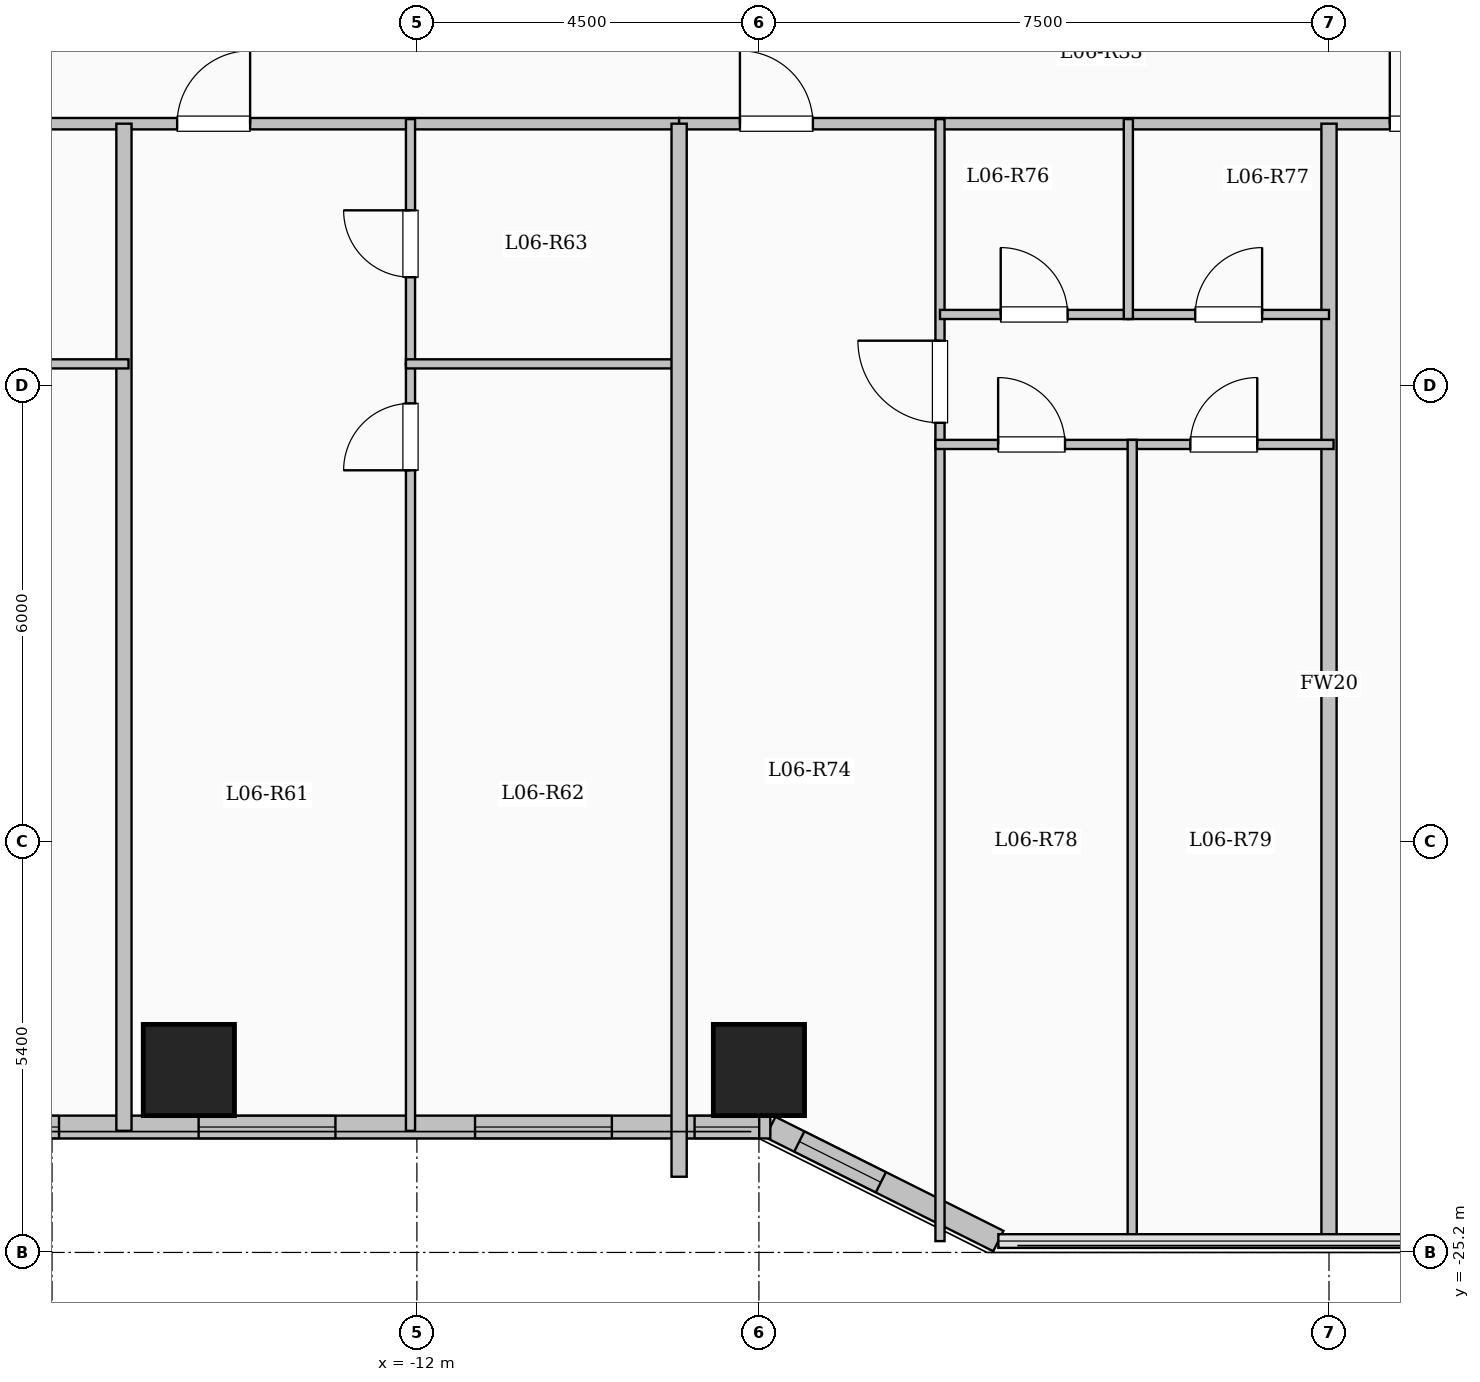
"""IFC4 building model, lengths in metres.
Left out: names, types, materials, properties, quantities, classifications, styles, units other than length and angle.
Written with IfcOpenShell. Run it as: python <this file> out.ifc"""

import sys

from ifc_helpers import new_model, si_unit, direction, frame, frame_2d, origin, origin_2d, place, context, subcontext, project, spatial, rectangle, extrude, element, fill, save


model = new_model("IFC4")
c1 = context("Model", 3, precision=1e-05, world=origin(), true_north=direction((0.0, 1.0)))
c2 = subcontext(c1, "Body", "Model", "MODEL_VIEW")
j1 = project(units=[si_unit("LENGTHUNIT", "METRE"), si_unit("PLANEANGLEUNIT", "RADIAN")], contexts=[c1])
p1 = place(None, origin())
s1 = spatial("IfcSite", under=j1, at=p1, CompositionType="ELEMENT")
p2 = place(p1, origin())
s2 = spatial("IfcBuilding", under=s1, at=p2, CompositionType="ELEMENT")
p3 = place(p2, frame((0.0, 0.0, 27.35)))
s3 = spatial("IfcBuildingStorey", under=s2, at=p3, CompositionType="ELEMENT", Elevation=27.35)
for number, where, z_axis, x_axis in (
    (1, (-15.0, -22.8, 0.0), (0.0, 0.0, 1.0), (1.0, 0.0, 0.0)),
    (2, (-7.5, -22.8, 0.0), (0.0, 0.0, 1.0), (1.0, 0.0, 0.0)),
):
    element("IfcColumn", number, at=place(p3, frame(where, z_axis=z_axis, x_axis=x_axis)), inside=s3, PredefinedType="COLUMN", context=c2, shape_type="SweptSolid", body=[
        extrude(rectangle(XDim=1.2, YDim=1.2, at=origin_2d()), origin(), (0.0, 0.0, 1.0), 3.35),
    ])
p4 = place(p3, frame((-4.35, -25.05, 0.0), z_axis=(0.0, 0.0, 1.0), x_axis=(-0.894427191, 0.4472135955, 0.0)))
e3 = element("IfcWall", 3, at=p4, inside=s3, PredefinedType="SOLIDWALL", context=c2, shape_type="SweptSolid", body=[
    extrude(rectangle(XDim=3.354, YDim=0.3, at=frame_2d((1.677, 0.0))), origin(), (0.0, 0.0, 1.0), 3.1),
])
p5 = place(p4, frame((1.728, 0.0, 0.95)))
e4 = element("IfcOpeningElement", 4, at=p5, cuts=e3, PredefinedType="OPENING", context=c2, shape_type="SweptSolid", body=[
    extrude(rectangle(XDim=1.2, YDim=1.5, at=frame_2d((0.6, 0.75))), frame((0.0, 0.16, 0.0), z_axis=(0.0, -1.0, 0.0), x_axis=(1.0, 0.0, 0.0)), (0.0, 0.0, 1.0), 0.32),
])
p6 = place(p3, frame((-7.35, -23.55, 0.0), z_axis=(0.0, 0.0, 1.0), x_axis=(-1.0, 0.0, 0.0)))
e5 = element("IfcWall", 5, at=p6, inside=s3, PredefinedType="SOLIDWALL", context=c2, shape_type="SweptSolid", body=[
    extrude(rectangle(XDim=15.3, YDim=0.3, at=frame_2d((7.65, 0.0))), origin(), (0.0, 0.0, 1.0), 3.1),
])
p7 = place(p6, frame((0.147, 0.0, 0.95)))
e6 = element("IfcOpeningElement", 6, at=p7, cuts=e5, PredefinedType="OPENING", context=c2, shape_type="SweptSolid", body=[
    extrude(rectangle(XDim=0.85, YDim=1.5, at=frame_2d((0.425, 0.75))), frame((0.0, 0.16, 0.0), z_axis=(0.0, -1.0, 0.0), x_axis=(1.0, 0.0, 0.0)), (0.0, 0.0, 1.0), 0.32),
])
p8 = place(p6, frame((2.085, 0.0, 0.9)))
e7 = element("IfcOpeningElement", 7, at=p8, cuts=e5, PredefinedType="OPENING", context=c2, shape_type="SweptSolid", body=[
    extrude(rectangle(XDim=1.8, YDim=1.65, at=frame_2d((0.9, 0.825))), frame((0.0, 0.16, 0.0), z_axis=(0.0, -1.0, 0.0), x_axis=(1.0, 0.0, 0.0)), (0.0, 0.0, 1.0), 0.32),
])
p9 = place(p6, frame((5.722, 0.0, 0.9)))
e8 = element("IfcOpeningElement", 8, at=p9, cuts=e5, PredefinedType="OPENING", context=c2, shape_type="SweptSolid", body=[
    extrude(rectangle(XDim=1.8, YDim=1.65, at=frame_2d((0.9, 0.825))), frame((0.0, 0.16, 0.0), z_axis=(0.0, -1.0, 0.0), x_axis=(1.0, 0.0, 0.0)), (0.0, 0.0, 1.0), 0.32),
])
p10 = place(p6, frame((9.358, 0.0, 0.9)))
e9 = element("IfcOpeningElement", 9, at=p10, cuts=e5, PredefinedType="OPENING", context=c2, shape_type="SweptSolid", body=[
    extrude(rectangle(XDim=1.5, YDim=1.65, at=frame_2d((0.75, 0.825))), frame((0.0, 0.16, 0.0), z_axis=(0.0, -1.0, 0.0), x_axis=(1.0, 0.0, 0.0)), (0.0, 0.0, 1.0), 0.32),
])
p11 = place(p6, frame((12.569, 0.0, 0.9)))
e10 = element("IfcOpeningElement", 10, at=p11, cuts=e5, PredefinedType="OPENING", context=c2, shape_type="SweptSolid", body=[
    extrude(rectangle(XDim=1.8, YDim=1.65, at=frame_2d((0.9, 0.825))), frame((0.0, 0.16, 0.0), z_axis=(0.0, -1.0, 0.0), x_axis=(1.0, 0.0, 0.0)), (0.0, 0.0, 1.0), 0.32),
])
p12 = place(p3, frame((-22.55, -10.35, 0.0), z_axis=(0.0, 0.0, 1.0), x_axis=(1.0, 0.0, 0.0)))
e11 = element("IfcWall", 11, at=p12, inside=s3, PredefinedType="PARTITIONING", context=c2, shape_type="SweptSolid", body=[
    extrude(rectangle(XDim=14.0, YDim=0.15, at=frame_2d((7.0, 0.0))), origin(), (0.0, 0.0, 1.0), 3.1),
])
p13 = place(p12, frame((0.7, 0.0, 0.0)))
e12 = element("IfcOpeningElement", 12, at=p13, cuts=e11, PredefinedType="OPENING", context=c2, shape_type="SweptSolid", body=[
    extrude(rectangle(XDim=0.96, YDim=2.15, at=frame_2d((0.48, 1.075))), frame((0.0, 0.085, 0.0), z_axis=(0.0, -1.0, 0.0), x_axis=(1.0, 0.0, 0.0)), (0.0, 0.0, 1.0), 0.17),
])
p14 = place(p12, frame((7.396, 0.0, 0.0)))
e13 = element("IfcOpeningElement", 13, at=p14, cuts=e11, PredefinedType="OPENING", context=c2, shape_type="SweptSolid", body=[
    extrude(rectangle(XDim=0.96, YDim=2.15, at=frame_2d((0.48, 1.075))), frame((0.0, 0.085, 0.0), z_axis=(0.0, -1.0, 0.0), x_axis=(1.0, 0.0, 0.0)), (0.0, 0.0, 1.0), 0.17),
])
p15 = place(p3, frame((-8.55, -10.35, 0.0), z_axis=(0.0, 0.0, 1.0), x_axis=(1.0, 0.0, 0.0)))
e14 = element("IfcWall", 14, at=p15, inside=s3, PredefinedType="PARTITIONING", context=c2, shape_type="SweptSolid", body=[
    extrude(rectangle(XDim=17.1, YDim=0.15, at=frame_2d((8.55, 0.0))), origin(), (0.0, 0.0, 1.0), 3.1),
])
p16 = place(p15, frame((0.8, 0.0, 0.0)))
e15 = element("IfcOpeningElement", 15, at=p16, cuts=e14, PredefinedType="OPENING", context=c2, shape_type="SweptSolid", body=[
    extrude(rectangle(XDim=0.96, YDim=2.15, at=frame_2d((0.48, 1.075))), frame((0.0, 0.085, 0.0), z_axis=(0.0, -1.0, 0.0), x_axis=(1.0, 0.0, 0.0)), (0.0, 0.0, 1.0), 0.17),
])
p17 = place(p15, frame((9.35, 0.0, 0.0)))
e16 = element("IfcOpeningElement", 16, at=p17, cuts=e14, PredefinedType="OPENING", context=c2, shape_type="SweptSolid", body=[
    extrude(rectangle(XDim=0.96, YDim=2.15, at=frame_2d((0.48, 1.075))), frame((0.0, 0.085, 0.0), z_axis=(0.0, -1.0, 0.0), x_axis=(1.0, 0.0, 0.0)), (0.0, 0.0, 1.0), 0.17),
])
p18 = place(p3, frame((-15.854, -23.6, 0.0), z_axis=(0.0, 0.0, 1.0), x_axis=(0.0, 1.0, 0.0)))
e17 = element("IfcWall", 17, at=p18, inside=s3, PredefinedType="SOLIDWALL", context=c2, shape_type="SweptSolid", body=[
    extrude(rectangle(XDim=13.25, YDim=0.2, at=frame_2d((6.625, 0.0))), origin(), (0.0, 0.0, 1.0), 3.1),
])
p19 = place(p3, frame((-19.13, -13.51, 0.0), z_axis=(0.0, 0.0, 1.0), x_axis=(1.0, 0.0, 0.0)))
e18 = element("IfcWall", 18, at=p19, inside=s3, PredefinedType="PARTITIONING", context=c2, shape_type="SweptSolid", body=[
    extrude(rectangle(XDim=3.336, YDim=0.12, at=frame_2d((1.668, 0.0))), origin(), (0.0, 0.0, 1.0), 3.1),
])
p20 = place(p3, frame((-12.084, -23.6, 0.0), z_axis=(0.0, 0.0, 1.0), x_axis=(0.0, 1.0, 0.0)))
e19 = element("IfcWall", 19, at=p20, inside=s3, PredefinedType="PARTITIONING", context=c2, shape_type="SweptSolid", body=[
    extrude(rectangle(XDim=10.09, YDim=0.12, at=frame_2d((5.045, 0.0))), origin(), (0.0, 0.0, 1.0), 3.1),
])
p21 = place(p20, frame((8.69, 0.0, 0.0)))
e20 = element("IfcOpeningElement", 20, at=p21, cuts=e19, PredefinedType="OPENING", context=c2, shape_type="SweptSolid", body=[
    extrude(rectangle(XDim=0.88, YDim=2.1, at=frame_2d((0.44, 1.05))), frame((0.0, 0.07, 0.0), z_axis=(0.0, -1.0, 0.0), x_axis=(1.0, 0.0, 0.0)), (0.0, 0.0, 1.0), 0.14),
])
p22 = place(p3, frame((-12.084, -13.51, 0.0), z_axis=(0.0, 0.0, 1.0), x_axis=(0.0, 1.0, 0.0)))
e21 = element("IfcWall", 21, at=p22, inside=s3, PredefinedType="PARTITIONING", context=c2, shape_type="SweptSolid", body=[
    extrude(rectangle(XDim=3.22, YDim=0.12, at=frame_2d((1.61, 0.0))), origin(), (0.0, 0.0, 1.0), 3.1),
])
p23 = place(p22, frame((1.14, 0.0, 0.0)))
e22 = element("IfcOpeningElement", 22, at=p23, cuts=e21, PredefinedType="OPENING", context=c2, shape_type="SweptSolid", body=[
    extrude(rectangle(XDim=0.88, YDim=2.1, at=frame_2d((0.44, 1.05))), frame((0.0, 0.07, 0.0), z_axis=(0.0, -1.0, 0.0), x_axis=(1.0, 0.0, 0.0)), (0.0, 0.0, 1.0), 0.14),
])
p24 = place(p3, frame((-12.144, -13.51, 0.0), z_axis=(0.0, 0.0, 1.0), x_axis=(1.0, 0.0, 0.0)))
e23 = element("IfcWall", 23, at=p24, inside=s3, PredefinedType="PARTITIONING", context=c2, shape_type="SweptSolid", body=[
    extrude(rectangle(XDim=3.604, YDim=0.12, at=frame_2d((1.802, 0.0))), origin(), (0.0, 0.0, 1.0), 3.1),
])
p25 = place(p3, frame((-8.55, -24.204, 0.0), z_axis=(0.0, 0.0, 1.0), x_axis=(0.0, 1.0, 0.0)))
e24 = element("IfcWall", 24, at=p25, inside=s3, PredefinedType="SOLIDWALL", context=c2, shape_type="SweptSolid", body=[
    extrude(rectangle(XDim=13.854, YDim=0.2, at=frame_2d((6.927, 0.0))), origin(), (0.0, 0.0, 1.0), 3.1),
])
p26 = place(p3, frame((0.0, -25.08, 0.0), z_axis=(0.0, 0.0, 1.0), x_axis=(0.0, 1.0, 0.0)))
e25 = element("IfcWall", 25, at=p26, inside=s3, PredefinedType="SOLIDWALL", context=c2, shape_type="SweptSolid", body=[
    extrude(rectangle(XDim=14.73, YDim=0.2, at=frame_2d((7.365, 0.0))), origin(), (0.0, 0.0, 1.0), 3.1),
])
p27 = place(p3, frame((-5.118, -25.051, 0.0), z_axis=(0.0, 0.0, 1.0), x_axis=(0.0, 1.0, 0.0)))
e26 = element("IfcWall", 26, at=p27, inside=s3, PredefinedType="PARTITIONING", context=c2, shape_type="SweptSolid", body=[
    extrude(rectangle(XDim=14.761, YDim=0.12, at=frame_2d((7.38, 0.0))), origin(), (0.0, 0.0, 1.0), 3.1),
])
p28 = place(p27, frame((10.766, 0.0, 0.0)))
e27 = element("IfcOpeningElement", 27, at=p28, cuts=e26, PredefinedType="OPENING", context=c2, shape_type="SweptSolid", body=[
    extrude(rectangle(XDim=1.08, YDim=2.15, at=frame_2d((0.54, 1.075))), frame((0.0, 0.07, 0.0), z_axis=(0.0, -1.0, 0.0), x_axis=(1.0, 0.0, 0.0)), (0.0, 0.0, 1.0), 0.14),
])
p29 = place(p3, frame((-5.118, -12.86, 0.0), z_axis=(0.0, 0.0, 1.0), x_axis=(1.0, 0.0, 0.0)))
e28 = element("IfcWall", 28, at=p29, inside=s3, PredefinedType="PARTITIONING", context=c2, shape_type="SweptSolid", body=[
    extrude(rectangle(XDim=2.478, YDim=0.12, at=frame_2d((1.239, 0.0))), origin(), (0.0, 0.0, 1.0), 2.585),
])
p30 = place(p29, frame((0.799, 0.0, 0.0)))
e29 = element("IfcOpeningElement", 29, at=p30, cuts=e28, PredefinedType="OPENING", context=c2, shape_type="SweptSolid", body=[
    extrude(rectangle(XDim=0.88, YDim=2.1, at=frame_2d((0.44, 1.05))), frame((0.0, 0.07, 0.0), z_axis=(0.0, -1.0, 0.0), x_axis=(1.0, 0.0, 0.0)), (0.0, 0.0, 1.0), 0.14),
])
p31 = place(p3, frame((-2.64, -12.86, 0.0), z_axis=(0.0, 0.0, 1.0), x_axis=(1.0, 0.0, 0.0)))
e30 = element("IfcWall", 30, at=p31, inside=s3, PredefinedType="PARTITIONING", context=c2, shape_type="SweptSolid", body=[
    extrude(rectangle(XDim=2.64, YDim=0.12, at=frame_2d((1.32, 0.0))), origin(), (0.0, 0.0, 1.0), 2.585),
])
p32 = place(p31, frame((0.88, 0.0, 0.0)))
e31 = element("IfcOpeningElement", 31, at=p32, cuts=e30, PredefinedType="OPENING", context=c2, shape_type="SweptSolid", body=[
    extrude(rectangle(XDim=0.88, YDim=2.1, at=frame_2d((0.44, 1.05))), frame((0.0, 0.07, 0.0), z_axis=(0.0, -1.0, 0.0), x_axis=(1.0, 0.0, 0.0)), (0.0, 0.0, 1.0), 0.14),
])
p33 = place(p3, frame((-5.178, -14.57, 0.0), z_axis=(0.0, 0.0, 1.0), x_axis=(1.0, 0.0, 0.0)))
e32 = element("IfcWall", 32, at=p33, inside=s3, PredefinedType="PARTITIONING", context=c2, shape_type="SweptSolid", body=[
    extrude(rectangle(XDim=5.238, YDim=0.12, at=frame_2d((2.619, 0.0))), origin(), (0.0, 0.0, 1.0), 3.1),
])
p34 = place(p33, frame((0.825, 0.0, 0.0)))
e33 = element("IfcOpeningElement", 33, at=p34, cuts=e32, PredefinedType="OPENING", context=c2, shape_type="SweptSolid", body=[
    extrude(rectangle(XDim=0.88, YDim=2.1, at=frame_2d((0.44, 1.05))), frame((0.0, 0.07, 0.0), z_axis=(0.0, -1.0, 0.0), x_axis=(1.0, 0.0, 0.0)), (0.0, 0.0, 1.0), 0.14),
])
p35 = place(p33, frame((3.354, 0.0, 0.0)))
e34 = element("IfcOpeningElement", 34, at=p35, cuts=e32, PredefinedType="OPENING", context=c2, shape_type="SweptSolid", body=[
    extrude(rectangle(XDim=0.88, YDim=2.1, at=frame_2d((0.44, 1.05))), frame((0.0, 0.07, 0.0), z_axis=(0.0, -1.0, 0.0), x_axis=(1.0, 0.0, 0.0)), (0.0, 0.0, 1.0), 0.14),
])
p36 = place(p3, frame((-2.64, -12.92, 0.0), z_axis=(0.0, 0.0, 1.0), x_axis=(0.0, 1.0, 0.0)))
e35 = element("IfcWall", 35, at=p36, inside=s3, PredefinedType="PARTITIONING", context=c2, shape_type="SweptSolid", body=[
    extrude(rectangle(XDim=2.63, YDim=0.12, at=frame_2d((1.315, 0.0))), origin(), (0.0, 0.0, 1.0), 3.1),
])
p37 = place(p3, frame((-2.589, -25.08, 0.0), z_axis=(0.0, 0.0, 1.0), x_axis=(0.0, 1.0, 0.0)))
e36 = element("IfcWall", 36, at=p37, inside=s3, PredefinedType="PARTITIONING", context=c2, shape_type="SweptSolid", body=[
    extrude(rectangle(XDim=10.57, YDim=0.12, at=frame_2d((5.285, 0.0))), origin(), (0.0, 0.0, 1.0), 3.1),
])
p38 = place(p5, origin())
e37 = element("IfcWindow", 37, at=p38, inside=s3, PartitioningType="SINGLE_PANEL", PredefinedType="WINDOW", context=c2, shape_type="SweptSolid", body=[
    extrude(rectangle(XDim=1.2, YDim=1.5, at=frame_2d((0.6, 0.75))), frame((0.0, 0.03, 0.0), z_axis=(0.0, -1.0, 0.0), x_axis=(1.0, 0.0, 0.0)), (0.0, 0.0, 1.0), 0.06),
])
fill(e4, e37)
p39 = place(p7, origin())
e38 = element("IfcWindow", 38, at=p39, inside=s3, PartitioningType="SINGLE_PANEL", PredefinedType="WINDOW", context=c2, shape_type="SweptSolid", body=[
    extrude(rectangle(XDim=0.85, YDim=1.5, at=frame_2d((0.425, 0.75))), frame((0.0, 0.03, 0.0), z_axis=(0.0, -1.0, 0.0), x_axis=(1.0, 0.0, 0.0)), (0.0, 0.0, 1.0), 0.06),
])
fill(e6, e38)
p40 = place(p8, origin())
e39 = element("IfcWindow", 39, at=p40, inside=s3, PartitioningType="SINGLE_PANEL", PredefinedType="WINDOW", context=c2, shape_type="SweptSolid", body=[
    extrude(rectangle(XDim=1.8, YDim=1.65, at=frame_2d((0.9, 0.825))), frame((0.0, 0.03, 0.0), z_axis=(0.0, -1.0, 0.0), x_axis=(1.0, 0.0, 0.0)), (0.0, 0.0, 1.0), 0.06),
])
fill(e7, e39)
p41 = place(p9, origin())
e40 = element("IfcWindow", 40, at=p41, inside=s3, PartitioningType="SINGLE_PANEL", PredefinedType="WINDOW", context=c2, shape_type="SweptSolid", body=[
    extrude(rectangle(XDim=1.8, YDim=1.65, at=frame_2d((0.9, 0.825))), frame((0.0, 0.03, 0.0), z_axis=(0.0, -1.0, 0.0), x_axis=(1.0, 0.0, 0.0)), (0.0, 0.0, 1.0), 0.06),
])
fill(e8, e40)
p42 = place(p10, origin())
e41 = element("IfcWindow", 41, at=p42, inside=s3, PartitioningType="SINGLE_PANEL", PredefinedType="WINDOW", context=c2, shape_type="SweptSolid", body=[
    extrude(rectangle(XDim=1.5, YDim=1.65, at=frame_2d((0.75, 0.825))), frame((0.0, 0.03, 0.0), z_axis=(0.0, -1.0, 0.0), x_axis=(1.0, 0.0, 0.0)), (0.0, 0.0, 1.0), 0.06),
])
fill(e9, e41)
p43 = place(p14, origin())
e42 = element("IfcDoor", 42, at=p43, inside=s3, OperationType="SINGLE_SWING_RIGHT", PredefinedType="DOOR", context=c2, shape_type="SweptSolid", body=[
    extrude(rectangle(XDim=0.96, YDim=2.15, at=frame_2d((0.48, 1.075))), frame((0.0, 0.025, 0.0), z_axis=(0.0, -1.0, 0.0), x_axis=(1.0, 0.0, 0.0)), (0.0, 0.0, 1.0), 0.05),
])
fill(e13, e42)
p44 = place(p21, origin())
e43 = element("IfcDoor", 43, at=p44, inside=s3, OperationType="SINGLE_SWING_LEFT", PredefinedType="DOOR", context=c2, shape_type="SweptSolid", body=[
    extrude(rectangle(XDim=0.88, YDim=2.1, at=frame_2d((0.44, 1.05))), frame((0.0, 0.025, 0.0), z_axis=(0.0, -1.0, 0.0), x_axis=(1.0, 0.0, 0.0)), (0.0, 0.0, 1.0), 0.05),
])
fill(e20, e43)
p45 = place(p23, origin())
e44 = element("IfcDoor", 44, at=p45, inside=s3, OperationType="SINGLE_SWING_RIGHT", PredefinedType="DOOR", context=c2, shape_type="SweptSolid", body=[
    extrude(rectangle(XDim=0.88, YDim=2.1, at=frame_2d((0.44, 1.05))), frame((0.0, 0.025, 0.0), z_axis=(0.0, -1.0, 0.0), x_axis=(1.0, 0.0, 0.0)), (0.0, 0.0, 1.0), 0.05),
])
fill(e22, e44)
p46 = place(p16, origin())
e45 = element("IfcDoor", 45, at=p46, inside=s3, OperationType="SINGLE_SWING_LEFT", PredefinedType="DOOR", context=c2, shape_type="SweptSolid", body=[
    extrude(rectangle(XDim=0.96, YDim=2.15, at=frame_2d((0.48, 1.075))), frame((0.0, 0.025, 0.0), z_axis=(0.0, -1.0, 0.0), x_axis=(1.0, 0.0, 0.0)), (0.0, 0.0, 1.0), 0.05),
])
fill(e15, e45)
p47 = place(p28, origin())
e46 = element("IfcDoor", 46, at=p47, inside=s3, OperationType="SINGLE_SWING_RIGHT", PredefinedType="DOOR", context=c2, shape_type="SweptSolid", body=[
    extrude(rectangle(XDim=1.08, YDim=2.15, at=frame_2d((0.54, 1.075))), frame((0.0, 0.025, 0.0), z_axis=(0.0, -1.0, 0.0), x_axis=(1.0, 0.0, 0.0)), (0.0, 0.0, 1.0), 0.05),
])
fill(e27, e46)
p48 = place(p30, origin())
e47 = element("IfcDoor", 47, at=p48, inside=s3, OperationType="SINGLE_SWING_LEFT", PredefinedType="DOOR", context=c2, shape_type="SweptSolid", body=[
    extrude(rectangle(XDim=0.88, YDim=2.1, at=frame_2d((0.44, 1.05))), frame((0.0, 0.025, 0.0), z_axis=(0.0, -1.0, 0.0), x_axis=(1.0, 0.0, 0.0)), (0.0, 0.0, 1.0), 0.05),
])
fill(e29, e47)
p49 = place(p32, origin())
e48 = element("IfcDoor", 48, at=p49, inside=s3, OperationType="SINGLE_SWING_RIGHT", PredefinedType="DOOR", context=c2, shape_type="SweptSolid", body=[
    extrude(rectangle(XDim=0.88, YDim=2.1, at=frame_2d((0.44, 1.05))), frame((0.0, 0.025, 0.0), z_axis=(0.0, -1.0, 0.0), x_axis=(1.0, 0.0, 0.0)), (0.0, 0.0, 1.0), 0.05),
])
fill(e31, e48)
p50 = place(p34, origin())
e49 = element("IfcDoor", 49, at=p50, inside=s3, OperationType="SINGLE_SWING_LEFT", PredefinedType="DOOR", context=c2, shape_type="SweptSolid", body=[
    extrude(rectangle(XDim=0.88, YDim=2.1, at=frame_2d((0.44, 1.05))), frame((0.0, 0.025, 0.0), z_axis=(0.0, -1.0, 0.0), x_axis=(1.0, 0.0, 0.0)), (0.0, 0.0, 1.0), 0.05),
])
fill(e33, e49)
p51 = place(p35, origin())
e50 = element("IfcDoor", 50, at=p51, inside=s3, OperationType="SINGLE_SWING_RIGHT", PredefinedType="DOOR", context=c2, shape_type="SweptSolid", body=[
    extrude(rectangle(XDim=0.88, YDim=2.1, at=frame_2d((0.44, 1.05))), frame((0.0, 0.025, 0.0), z_axis=(0.0, -1.0, 0.0), x_axis=(1.0, 0.0, 0.0)), (0.0, 0.0, 1.0), 0.05),
])
fill(e34, e50)
p52 = place(p17, origin())
e51 = element("IfcDoor", 51, at=p52, inside=s3, OperationType="SINGLE_SWING_LEFT", PredefinedType="DOOR", context=c2, shape_type="SweptSolid", body=[
    extrude(rectangle(XDim=0.96, YDim=2.15, at=frame_2d((0.48, 1.075))), frame((0.0, 0.025, 0.0), z_axis=(0.0, -1.0, 0.0), x_axis=(1.0, 0.0, 0.0)), (0.0, 0.0, 1.0), 0.05),
])
fill(e16, e51)
save(model, sys.argv[1])
